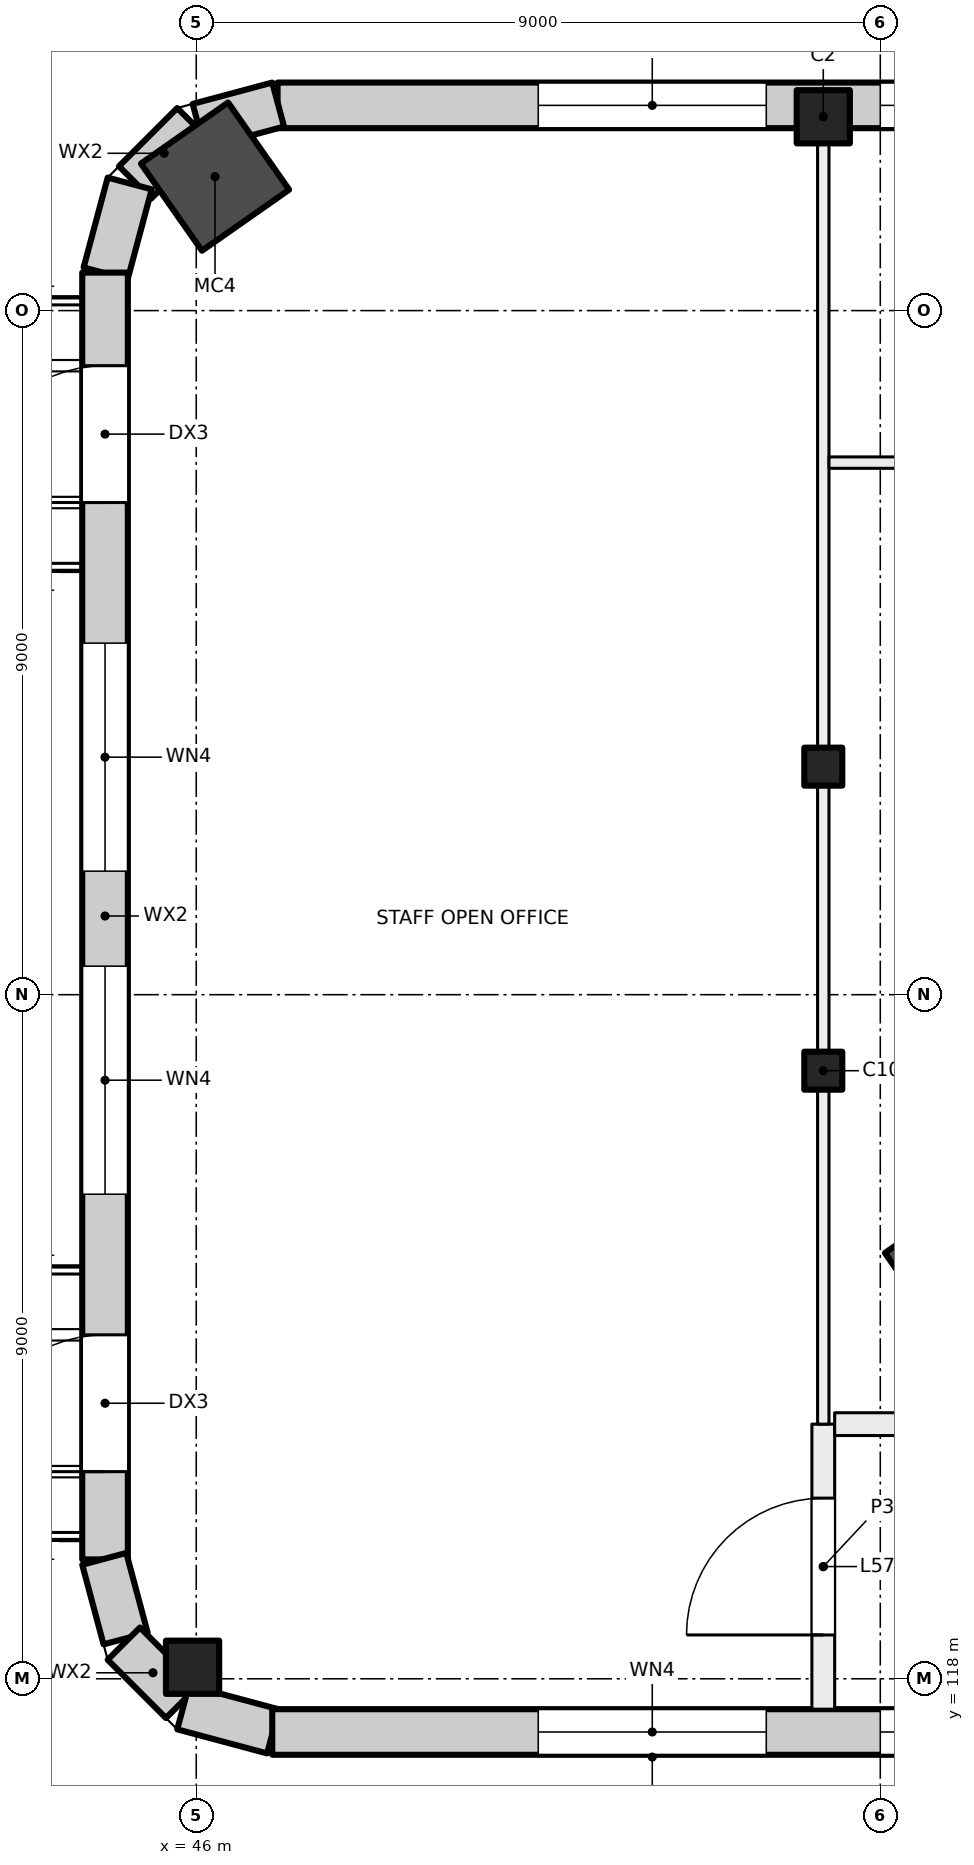
"""IFC4 building model, lengths in metres.
Left out: names, types, materials, properties, quantities, classifications, styles, units other than length and angle.
Written with IfcOpenShell. Run it as: python <this file> out.ifc"""

import sys

from ifc_helpers import new_model, si_unit, direction, frame, frame_2d, origin, origin_2d, place, context, subcontext, project, spatial, rectangle, hollow_rectangle, extrude, element, fill, save


model = new_model("IFC4")
c1 = context("Model", 3, precision=1e-05, world=origin(), true_north=direction((0.0, 1.0)))
c2 = subcontext(c1, "Body", "Model", "MODEL_VIEW")
j1 = project(units=[si_unit("LENGTHUNIT", "METRE"), si_unit("PLANEANGLEUNIT", "RADIAN")], contexts=[c1])
p1 = place(None, origin())
s1 = spatial("IfcSite", under=j1, at=p1, CompositionType="ELEMENT")
p2 = place(p1, origin())
s2 = spatial("IfcBuilding", under=s1, at=p2, CompositionType="ELEMENT")
p3 = place(p2, frame((0.0, 0.0, 241.5)))
s3 = spatial("IfcBuildingStorey", under=s2, at=p3, CompositionType="ELEMENT", Elevation=241.5)
for number, where, z_axis, x_axis in (
    (1, (46.247, 137.762, 0.0), (0.0, 0.0, 1.0), (0.574, -0.819, 0.0)),
    (2, (56.036, 123.43, 0.0), (0.0, 0.0, 1.0), (0.574, -0.819, 0.0)),
):
    element("IfcColumn", number, at=place(p3, frame(where, z_axis=z_axis, x_axis=x_axis)), inside=s3, PredefinedType="COLUMN", context=c2, shape_type="SweptSolid", body=[
        extrude(hollow_rectangle(XDim=1.4, YDim=1.4, WallThickness=0.025, at=origin_2d()), origin(), (0.0, 0.0, 1.0), 4.0),
    ])
for number, where, z_axis, x_axis in (
    (3, (54.25, 130.0, 0.0), (0.0, 0.0, 1.0), (1.0, 0.0, 0.0)),
    (4, (54.25, 126.0, 0.0), (0.0, 0.0, 1.0), (1.0, 0.0, 0.0)),
):
    element("IfcColumn", number, at=place(p3, frame(where, z_axis=z_axis, x_axis=x_axis)), inside=s3, PredefinedType="COLUMN", context=c2, shape_type="SweptSolid", body=[
        extrude(rectangle(XDim=0.5, YDim=0.5, at=origin_2d()), origin(), (0.0, 0.0, 1.0), 4.0),
    ])
for number, where, z_axis, x_axis in (
    (5, (54.25, 138.55, 0.0), (0.0, 0.0, 1.0), (1.0, 0.0, 0.0)),
    (6, (45.952, 118.152, 0.0), (0.0, 0.0, 1.0), (1.0, 0.0, 0.0)),
):
    element("IfcColumn", number, at=place(p3, frame(where, z_axis=z_axis, x_axis=x_axis)), inside=s3, PredefinedType="COLUMN", context=c2, shape_type="SweptSolid", body=[
        extrude(rectangle(XDim=0.7, YDim=0.7, at=origin_2d()), origin(), (0.0, 0.0, 1.0), 4.0),
    ])
p4 = place(p3, frame((47.07, 138.7, 0.0), z_axis=(0.0, 0.0, 1.0), x_axis=(1.0, 0.0, 0.0)))
e7 = element("IfcWall", 7, at=p4, inside=s3, PredefinedType="SOLIDWALL", context=c2, shape_type="SweptSolid", body=[
    extrude(rectangle(XDim=43.91, YDim=0.6, at=frame_2d((21.955, 0.0))), origin(), (0.0, 0.0, 1.0), 3.625),
])
p5 = place(p4, frame((3.43, 0.0, 0.9)))
e8 = element("IfcOpeningElement", 8, at=p5, cuts=e7, PredefinedType="OPENING", context=c2, shape_type="SweptSolid", body=[
    extrude(rectangle(XDim=3.0, YDim=2.4, at=frame_2d((1.5, 1.2))), frame((0.0, 0.31, 0.0), z_axis=(0.0, -1.0, 0.0), x_axis=(1.0, 0.0, 0.0)), (0.0, 0.0, 1.0), 0.62),
])
p6 = place(p4, frame((7.93, 0.0, 0.9)))
e9 = element("IfcOpeningElement", 9, at=p6, cuts=e7, PredefinedType="OPENING", context=c2, shape_type="SweptSolid", body=[
    extrude(rectangle(XDim=3.0, YDim=2.4, at=frame_2d((1.5, 1.2))), frame((0.0, 0.31, 0.0), z_axis=(0.0, -1.0, 0.0), x_axis=(1.0, 0.0, 0.0)), (0.0, 0.0, 1.0), 0.62),
])
p7 = place(p4, frame((13.03, 0.0, 0.0)))
e10 = element("IfcOpeningElement", 10, at=p7, cuts=e7, PredefinedType="OPENING", context=c2, shape_type="SweptSolid", body=[
    extrude(rectangle(XDim=1.8, YDim=2.4, at=frame_2d((0.9, 1.2))), frame((0.0, 0.31, 0.0), z_axis=(0.0, -1.0, 0.0), x_axis=(1.0, 0.0, 0.0)), (0.0, 0.0, 1.0), 0.62),
])
p8 = place(p4, frame((16.93, 0.0, 0.9)))
e11 = element("IfcOpeningElement", 11, at=p8, cuts=e7, PredefinedType="OPENING", context=c2, shape_type="SweptSolid", body=[
    extrude(rectangle(XDim=3.0, YDim=2.4, at=frame_2d((1.5, 1.2))), frame((0.0, 0.31, 0.0), z_axis=(0.0, -1.0, 0.0), x_axis=(1.0, 0.0, 0.0)), (0.0, 0.0, 1.0), 0.62),
])
p9 = place(p4, frame((21.43, 0.0, 0.9)))
e12 = element("IfcOpeningElement", 12, at=p9, cuts=e7, PredefinedType="OPENING", context=c2, shape_type="SweptSolid", body=[
    extrude(rectangle(XDim=3.0, YDim=2.4, at=frame_2d((1.5, 1.2))), frame((0.0, 0.31, 0.0), z_axis=(0.0, -1.0, 0.0), x_axis=(1.0, 0.0, 0.0)), (0.0, 0.0, 1.0), 0.62),
])
p10 = place(p4, frame((25.93, 0.0, 0.9)))
e13 = element("IfcOpeningElement", 13, at=p10, cuts=e7, PredefinedType="OPENING", context=c2, shape_type="SweptSolid", body=[
    extrude(rectangle(XDim=3.0, YDim=2.4, at=frame_2d((1.5, 1.2))), frame((0.0, 0.31, 0.0), z_axis=(0.0, -1.0, 0.0), x_axis=(1.0, 0.0, 0.0)), (0.0, 0.0, 1.0), 0.62),
])
p11 = place(p4, frame((30.43, 0.0, 0.9)))
e14 = element("IfcOpeningElement", 14, at=p11, cuts=e7, PredefinedType="OPENING", context=c2, shape_type="SweptSolid", body=[
    extrude(rectangle(XDim=3.0, YDim=2.4, at=frame_2d((1.5, 1.2))), frame((0.0, 0.31, 0.0), z_axis=(0.0, -1.0, 0.0), x_axis=(1.0, 0.0, 0.0)), (0.0, 0.0, 1.0), 0.62),
])
p12 = place(p4, frame((34.93, 0.0, 0.9)))
e15 = element("IfcOpeningElement", 15, at=p12, cuts=e7, PredefinedType="OPENING", context=c2, shape_type="SweptSolid", body=[
    extrude(rectangle(XDim=3.0, YDim=2.4, at=frame_2d((1.5, 1.2))), frame((0.0, 0.31, 0.0), z_axis=(0.0, -1.0, 0.0), x_axis=(1.0, 0.0, 0.0)), (0.0, 0.0, 1.0), 0.62),
])
p13 = place(p4, frame((39.43, 0.0, 0.9)))
e16 = element("IfcOpeningElement", 16, at=p13, cuts=e7, PredefinedType="OPENING", context=c2, shape_type="SweptSolid", body=[
    extrude(rectangle(XDim=3.0, YDim=2.4, at=frame_2d((1.5, 1.2))), frame((0.0, 0.31, 0.0), z_axis=(0.0, -1.0, 0.0), x_axis=(1.0, 0.0, 0.0)), (0.0, 0.0, 1.0), 0.62),
])
p14 = place(p3, frame((46.031, 138.43, 0.0), z_axis=(0.0, 0.0, 1.0), x_axis=(0.965939004864, 0.25876985698, 0.0)))
e17 = element("IfcWall", 17, at=p14, inside=s3, PredefinedType="SOLIDWALL", context=c2, shape_type="SweptSolid", body=[
    extrude(rectangle(XDim=1.084, YDim=0.6, at=frame_2d((0.542, 0.0))), origin(), (0.0, 0.0, 1.0), 3.625),
])
p15 = place(p3, frame((45.196, 137.686, 0.0), z_axis=(0.0, 0.0, 1.0), x_axis=(0.707106781187, 0.707106781187, 0.0)))
e18 = element("IfcWall", 18, at=p15, inside=s3, PredefinedType="SOLIDWALL", context=c2, shape_type="SweptSolid", body=[
    extrude(rectangle(XDim=1.084, YDim=0.6, at=frame_2d((0.542, 0.0))), origin(), (0.0, 0.0, 1.0), 3.625),
])
p16 = place(p3, frame((44.808, 136.49, 0.0), z_axis=(0.0, 0.0, 1.0), x_axis=(0.258878975098, 0.965909766102, 0.0)))
e19 = element("IfcWall", 19, at=p16, inside=s3, PredefinedType="SOLIDWALL", context=c2, shape_type="SweptSolid", body=[
    extrude(rectangle(XDim=1.224, YDim=0.6, at=frame_2d((0.612, 0.0))), origin(), (0.0, 0.0, 1.0), 3.625),
])
p17 = place(p3, frame((44.8, 119.57, 0.0), z_axis=(0.0, 0.0, 1.0), x_axis=(0.0, 1.0, 0.0)))
e20 = element("IfcWall", 20, at=p17, inside=s3, PredefinedType="SOLIDWALL", context=c2, shape_type="SweptSolid", body=[
    extrude(rectangle(XDim=16.93, YDim=0.6, at=frame_2d((8.465, 0.0))), origin(), (0.0, 0.0, 1.0), 3.625),
])
p18 = place(p17, frame((1.155, 0.0, 0.0)))
e21 = element("IfcOpeningElement", 21, at=p18, cuts=e20, PredefinedType="OPENING", context=c2, shape_type="SweptSolid", body=[
    extrude(rectangle(XDim=1.8, YDim=2.4, at=frame_2d((0.9, 1.2))), frame((0.0, 0.31, 0.0), z_axis=(0.0, -1.0, 0.0), x_axis=(1.0, 0.0, 0.0)), (0.0, 0.0, 1.0), 0.62),
])
p19 = place(p17, frame((4.805, 0.0, 0.9)))
e22 = element("IfcOpeningElement", 22, at=p19, cuts=e20, PredefinedType="OPENING", context=c2, shape_type="SweptSolid", body=[
    extrude(rectangle(XDim=3.0, YDim=2.4, at=frame_2d((1.5, 1.2))), frame((0.0, 0.31, 0.0), z_axis=(0.0, -1.0, 0.0), x_axis=(1.0, 0.0, 0.0)), (0.0, 0.0, 1.0), 0.62),
])
p20 = place(p17, frame((9.055, 0.0, 0.9)))
e23 = element("IfcOpeningElement", 23, at=p20, cuts=e20, PredefinedType="OPENING", context=c2, shape_type="SweptSolid", body=[
    extrude(rectangle(XDim=3.0, YDim=2.4, at=frame_2d((1.5, 1.2))), frame((0.0, 0.31, 0.0), z_axis=(0.0, -1.0, 0.0), x_axis=(1.0, 0.0, 0.0)), (0.0, 0.0, 1.0), 0.62),
])
p21 = place(p17, frame((13.905, 0.0, 0.0)))
e24 = element("IfcOpeningElement", 24, at=p21, cuts=e20, PredefinedType="OPENING", context=c2, shape_type="SweptSolid", body=[
    extrude(rectangle(XDim=1.8, YDim=2.4, at=frame_2d((0.9, 1.2))), frame((0.0, 0.31, 0.0), z_axis=(0.0, -1.0, 0.0), x_axis=(1.0, 0.0, 0.0)), (0.0, 0.0, 1.0), 0.62),
])
p22 = place(p3, frame((45.07, 118.531, 0.0), z_axis=(0.0, 0.0, 1.0), x_axis=(-0.25876985698, 0.965939004864, 0.0)))
e25 = element("IfcWall", 25, at=p22, inside=s3, PredefinedType="SOLIDWALL", context=c2, shape_type="SweptSolid", body=[
    extrude(rectangle(XDim=1.084, YDim=0.6, at=frame_2d((0.542, 0.0))), origin(), (0.0, 0.0, 1.0), 3.625),
])
p23 = place(p3, frame((45.814, 117.696, 0.0), z_axis=(0.0, 0.0, 1.0), x_axis=(-0.707106781187, 0.707106781187, 0.0)))
e26 = element("IfcWall", 26, at=p23, inside=s3, PredefinedType="SOLIDWALL", context=c2, shape_type="SweptSolid", body=[
    extrude(rectangle(XDim=1.084, YDim=0.6, at=frame_2d((0.542, 0.0))), origin(), (0.0, 0.0, 1.0), 3.625),
])
p24 = place(p3, frame((47.01, 117.308, 0.0), z_axis=(0.0, 0.0, 1.0), x_axis=(-0.965909766102, 0.258878975098, 0.0)))
e27 = element("IfcWall", 27, at=p24, inside=s3, PredefinedType="SOLIDWALL", context=c2, shape_type="SweptSolid", body=[
    extrude(rectangle(XDim=1.224, YDim=0.6, at=frame_2d((0.612, 0.0))), origin(), (0.0, 0.0, 1.0), 3.625),
])
p25 = place(p3, frame((90.98, 117.3, 0.0), z_axis=(0.0, 0.0, 1.0), x_axis=(-1.0, 0.0, 0.0)))
e28 = element("IfcWall", 28, at=p25, inside=s3, PredefinedType="SOLIDWALL", context=c2, shape_type="SweptSolid", body=[
    extrude(rectangle(XDim=43.98, YDim=0.6, at=frame_2d((21.99, 0.0))), origin(), (0.0, 0.0, 1.0), 3.625),
])
p26 = place(p25, frame((1.48, 0.0, 0.9)))
e29 = element("IfcOpeningElement", 29, at=p26, cuts=e28, PredefinedType="OPENING", context=c2, shape_type="SweptSolid", body=[
    extrude(rectangle(XDim=3.0, YDim=2.4, at=frame_2d((1.5, 1.2))), frame((0.0, 0.31, 0.0), z_axis=(0.0, -1.0, 0.0), x_axis=(1.0, 0.0, 0.0)), (0.0, 0.0, 1.0), 0.62),
])
p27 = place(p25, frame((5.98, 0.0, 0.9)))
e30 = element("IfcOpeningElement", 30, at=p27, cuts=e28, PredefinedType="OPENING", context=c2, shape_type="SweptSolid", body=[
    extrude(rectangle(XDim=3.0, YDim=2.4, at=frame_2d((1.5, 1.2))), frame((0.0, 0.31, 0.0), z_axis=(0.0, -1.0, 0.0), x_axis=(1.0, 0.0, 0.0)), (0.0, 0.0, 1.0), 0.62),
])
p28 = place(p25, frame((10.48, 0.0, 0.9)))
e31 = element("IfcOpeningElement", 31, at=p28, cuts=e28, PredefinedType="OPENING", context=c2, shape_type="SweptSolid", body=[
    extrude(rectangle(XDim=3.0, YDim=2.4, at=frame_2d((1.5, 1.2))), frame((0.0, 0.31, 0.0), z_axis=(0.0, -1.0, 0.0), x_axis=(1.0, 0.0, 0.0)), (0.0, 0.0, 1.0), 0.62),
])
p29 = place(p25, frame((14.98, 0.0, 0.9)))
e32 = element("IfcOpeningElement", 32, at=p29, cuts=e28, PredefinedType="OPENING", context=c2, shape_type="SweptSolid", body=[
    extrude(rectangle(XDim=3.0, YDim=2.4, at=frame_2d((1.5, 1.2))), frame((0.0, 0.31, 0.0), z_axis=(0.0, -1.0, 0.0), x_axis=(1.0, 0.0, 0.0)), (0.0, 0.0, 1.0), 0.62),
])
p30 = place(p25, frame((19.48, 0.0, 0.9)))
e33 = element("IfcOpeningElement", 33, at=p30, cuts=e28, PredefinedType="OPENING", context=c2, shape_type="SweptSolid", body=[
    extrude(rectangle(XDim=3.0, YDim=2.4, at=frame_2d((1.5, 1.2))), frame((0.0, 0.31, 0.0), z_axis=(0.0, -1.0, 0.0), x_axis=(1.0, 0.0, 0.0)), (0.0, 0.0, 1.0), 0.62),
])
p31 = place(p25, frame((23.98, 0.0, 0.9)))
e34 = element("IfcOpeningElement", 34, at=p31, cuts=e28, PredefinedType="OPENING", context=c2, shape_type="SweptSolid", body=[
    extrude(rectangle(XDim=3.0, YDim=2.4, at=frame_2d((1.5, 1.2))), frame((0.0, 0.31, 0.0), z_axis=(0.0, -1.0, 0.0), x_axis=(1.0, 0.0, 0.0)), (0.0, 0.0, 1.0), 0.62),
])
p32 = place(p25, frame((29.08, 0.0, 0.0)))
e35 = element("IfcOpeningElement", 35, at=p32, cuts=e28, PredefinedType="OPENING", context=c2, shape_type="SweptSolid", body=[
    extrude(rectangle(XDim=1.8, YDim=2.4, at=frame_2d((0.9, 1.2))), frame((0.0, 0.31, 0.0), z_axis=(0.0, -1.0, 0.0), x_axis=(1.0, 0.0, 0.0)), (0.0, 0.0, 1.0), 0.62),
])
p33 = place(p25, frame((32.98, 0.0, 0.9)))
e36 = element("IfcOpeningElement", 36, at=p33, cuts=e28, PredefinedType="OPENING", context=c2, shape_type="SweptSolid", body=[
    extrude(rectangle(XDim=3.0, YDim=2.4, at=frame_2d((1.5, 1.2))), frame((0.0, 0.31, 0.0), z_axis=(0.0, -1.0, 0.0), x_axis=(1.0, 0.0, 0.0)), (0.0, 0.0, 1.0), 0.62),
])
p34 = place(p25, frame((37.48, 0.0, 0.9)))
e37 = element("IfcOpeningElement", 37, at=p34, cuts=e28, PredefinedType="OPENING", context=c2, shape_type="SweptSolid", body=[
    extrude(rectangle(XDim=3.0, YDim=2.4, at=frame_2d((1.5, 1.2))), frame((0.0, 0.31, 0.0), z_axis=(0.0, -1.0, 0.0), x_axis=(1.0, 0.0, 0.0)), (0.0, 0.0, 1.0), 0.62),
])
p35 = place(p3, frame((54.25, 117.6, 0.0), z_axis=(0.0, 0.0, 1.0), x_axis=(0.0, 1.0, 0.0)))
e38 = element("IfcWall", 38, at=p35, inside=s3, PredefinedType="PARTITIONING", context=c2, shape_type="SweptSolid", body=[
    extrude(rectangle(XDim=3.75, YDim=0.3, at=frame_2d((1.875, 0.0))), origin(), (0.0, 0.0, 1.0), 3.625),
])
p36 = place(p35, frame((0.977, 0.0, 0.0)))
e39 = element("IfcOpeningElement", 39, at=p36, cuts=e38, PredefinedType="OPENING", context=c2, shape_type="SweptSolid", body=[
    extrude(rectangle(XDim=1.8, YDim=2.1, at=frame_2d((0.9, 1.05))), frame((0.0, 0.16, 0.0), z_axis=(0.0, -1.0, 0.0), x_axis=(1.0, 0.0, 0.0)), (0.0, 0.0, 1.0), 0.32),
])
p37 = place(p3, frame((54.25, 121.35, 0.0), z_axis=(0.0, 0.0, 1.0), x_axis=(0.0, 1.0, 0.0)))
e40 = element("IfcWall", 40, at=p37, inside=s3, PredefinedType="PARTITIONING", context=c2, shape_type="SweptSolid", body=[
    extrude(rectangle(XDim=17.05, YDim=0.15, at=frame_2d((8.525, 0.0))), origin(), (0.0, 0.0, 1.0), 3.625),
])
p38 = place(p3, frame((54.4, 121.35, 0.0), z_axis=(0.0, 0.0, 1.0), x_axis=(1.0, 0.0, 0.0)))
e41 = element("IfcWall", 41, at=p38, inside=s3, PredefinedType="PARTITIONING", context=c2, shape_type="SweptSolid", body=[
    extrude(rectangle(XDim=31.353, YDim=0.3, at=frame_2d((15.677, 0.0))), origin(), (0.0, 0.0, 1.0), 3.625),
])
p39 = place(p38, frame((26.35, 0.0, 0.0)))
e42 = element("IfcOpeningElement", 42, at=p39, cuts=e41, PredefinedType="OPENING", context=c2, shape_type="SweptSolid", body=[
    extrude(rectangle(XDim=1.0, YDim=2.1, at=frame_2d((0.5, 1.05))), frame((0.0, 0.16, 0.0), z_axis=(0.0, -1.0, 0.0), x_axis=(1.0, 0.0, 0.0)), (0.0, 0.0, 1.0), 0.32),
])
p40 = place(p38, frame((10.265, 0.0, 0.0)))
e43 = element("IfcOpeningElement", 43, at=p40, cuts=e41, PredefinedType="OPENING", context=c2, shape_type="SweptSolid", body=[
    extrude(rectangle(XDim=1.8, YDim=2.1, at=frame_2d((0.9, 1.05))), frame((0.0, 0.16, 0.0), z_axis=(0.0, -1.0, 0.0), x_axis=(1.0, 0.0, 0.0)), (0.0, 0.0, 1.0), 0.32),
])
p41 = place(p3, frame((58.825, 134.0, 0.0), z_axis=(0.0, 0.0, 1.0), x_axis=(-1.0, 0.0, 0.0)))
e44 = element("IfcWall", 44, at=p41, inside=s3, PredefinedType="PARTITIONING", context=c2, shape_type="SweptSolid", body=[
    extrude(rectangle(XDim=4.5, YDim=0.15, at=frame_2d((2.25, 0.0))), origin(), (0.0, 0.0, 1.0), 3.625),
])
p42 = place(p41, frame((1.798, 0.0, 0.0)))
e45 = element("IfcOpeningElement", 45, at=p42, cuts=e44, PredefinedType="OPENING", context=c2, shape_type="SweptSolid", body=[
    extrude(rectangle(XDim=1.0, YDim=2.1, at=frame_2d((0.5, 1.05))), frame((0.0, 0.085, 0.0), z_axis=(0.0, -1.0, 0.0), x_axis=(1.0, 0.0, 0.0)), (0.0, 0.0, 1.0), 0.17),
])
p43 = place(p5, origin())
e46 = element("IfcWindow", 46, at=p43, inside=s3, PartitioningType="SINGLE_PANEL", PredefinedType="WINDOW", context=c2, shape_type="SweptSolid", body=[
    extrude(rectangle(XDim=3.0, YDim=2.4, at=frame_2d((1.5, 1.2))), frame((0.0, 0.03, 0.0), z_axis=(0.0, -1.0, 0.0), x_axis=(1.0, 0.0, 0.0)), (0.0, 0.0, 1.0), 0.06),
])
fill(e8, e46)
p44 = place(p6, origin())
e47 = element("IfcWindow", 47, at=p44, inside=s3, PartitioningType="SINGLE_PANEL", PredefinedType="WINDOW", context=c2, shape_type="SweptSolid", body=[
    extrude(rectangle(XDim=3.0, YDim=2.4, at=frame_2d((1.5, 1.2))), frame((0.0, 0.03, 0.0), z_axis=(0.0, -1.0, 0.0), x_axis=(1.0, 0.0, 0.0)), (0.0, 0.0, 1.0), 0.06),
])
fill(e9, e47)
p45 = place(p18, origin())
e48 = element("IfcDoor", 48, at=p45, inside=s3, OperationType="DOUBLE_DOOR_SINGLE_SWING", PredefinedType="DOOR", context=c2, shape_type="SweptSolid", body=[
    extrude(rectangle(XDim=1.8, YDim=2.4, at=frame_2d((0.9, 1.2))), frame((0.0, 0.025, 0.0), z_axis=(0.0, -1.0, 0.0), x_axis=(1.0, 0.0, 0.0)), (0.0, 0.0, 1.0), 0.05),
])
fill(e21, e48)
p46 = place(p19, origin())
e49 = element("IfcWindow", 49, at=p46, inside=s3, PartitioningType="SINGLE_PANEL", PredefinedType="WINDOW", context=c2, shape_type="SweptSolid", body=[
    extrude(rectangle(XDim=3.0, YDim=2.4, at=frame_2d((1.5, 1.2))), frame((0.0, 0.03, 0.0), z_axis=(0.0, -1.0, 0.0), x_axis=(1.0, 0.0, 0.0)), (0.0, 0.0, 1.0), 0.06),
])
fill(e22, e49)
p47 = place(p20, origin())
e50 = element("IfcWindow", 50, at=p47, inside=s3, PartitioningType="SINGLE_PANEL", PredefinedType="WINDOW", context=c2, shape_type="SweptSolid", body=[
    extrude(rectangle(XDim=3.0, YDim=2.4, at=frame_2d((1.5, 1.2))), frame((0.0, 0.03, 0.0), z_axis=(0.0, -1.0, 0.0), x_axis=(1.0, 0.0, 0.0)), (0.0, 0.0, 1.0), 0.06),
])
fill(e23, e50)
p48 = place(p21, origin())
e51 = element("IfcDoor", 51, at=p48, inside=s3, OperationType="DOUBLE_DOOR_SINGLE_SWING", PredefinedType="DOOR", context=c2, shape_type="SweptSolid", body=[
    extrude(rectangle(XDim=1.8, YDim=2.4, at=frame_2d((0.9, 1.2))), frame((0.0, 0.025, 0.0), z_axis=(0.0, -1.0, 0.0), x_axis=(1.0, 0.0, 0.0)), (0.0, 0.0, 1.0), 0.05),
])
fill(e24, e51)
p49 = place(p33, origin())
e52 = element("IfcWindow", 52, at=p49, inside=s3, PartitioningType="SINGLE_PANEL", PredefinedType="WINDOW", context=c2, shape_type="SweptSolid", body=[
    extrude(rectangle(XDim=3.0, YDim=2.4, at=frame_2d((1.5, 1.2))), frame((0.0, 0.03, 0.0), z_axis=(0.0, -1.0, 0.0), x_axis=(1.0, 0.0, 0.0)), (0.0, 0.0, 1.0), 0.06),
])
fill(e36, e52)
p50 = place(p34, origin())
e53 = element("IfcWindow", 53, at=p50, inside=s3, PartitioningType="SINGLE_PANEL", PredefinedType="WINDOW", context=c2, shape_type="SweptSolid", body=[
    extrude(rectangle(XDim=3.0, YDim=2.4, at=frame_2d((1.5, 1.2))), frame((0.0, 0.03, 0.0), z_axis=(0.0, -1.0, 0.0), x_axis=(1.0, 0.0, 0.0)), (0.0, 0.0, 1.0), 0.06),
])
fill(e37, e53)
p51 = place(p36, origin())
e54 = element("IfcDoor", 54, at=p51, inside=s3, OperationType="DOUBLE_DOOR_SINGLE_SWING", PredefinedType="DOOR", context=c2, shape_type="SweptSolid", body=[
    extrude(rectangle(XDim=1.8, YDim=2.1, at=frame_2d((0.9, 1.05))), frame((0.0, 0.025, 0.0), z_axis=(0.0, -1.0, 0.0), x_axis=(1.0, 0.0, 0.0)), (0.0, 0.0, 1.0), 0.05),
])
fill(e39, e54)
save(model, sys.argv[1])
